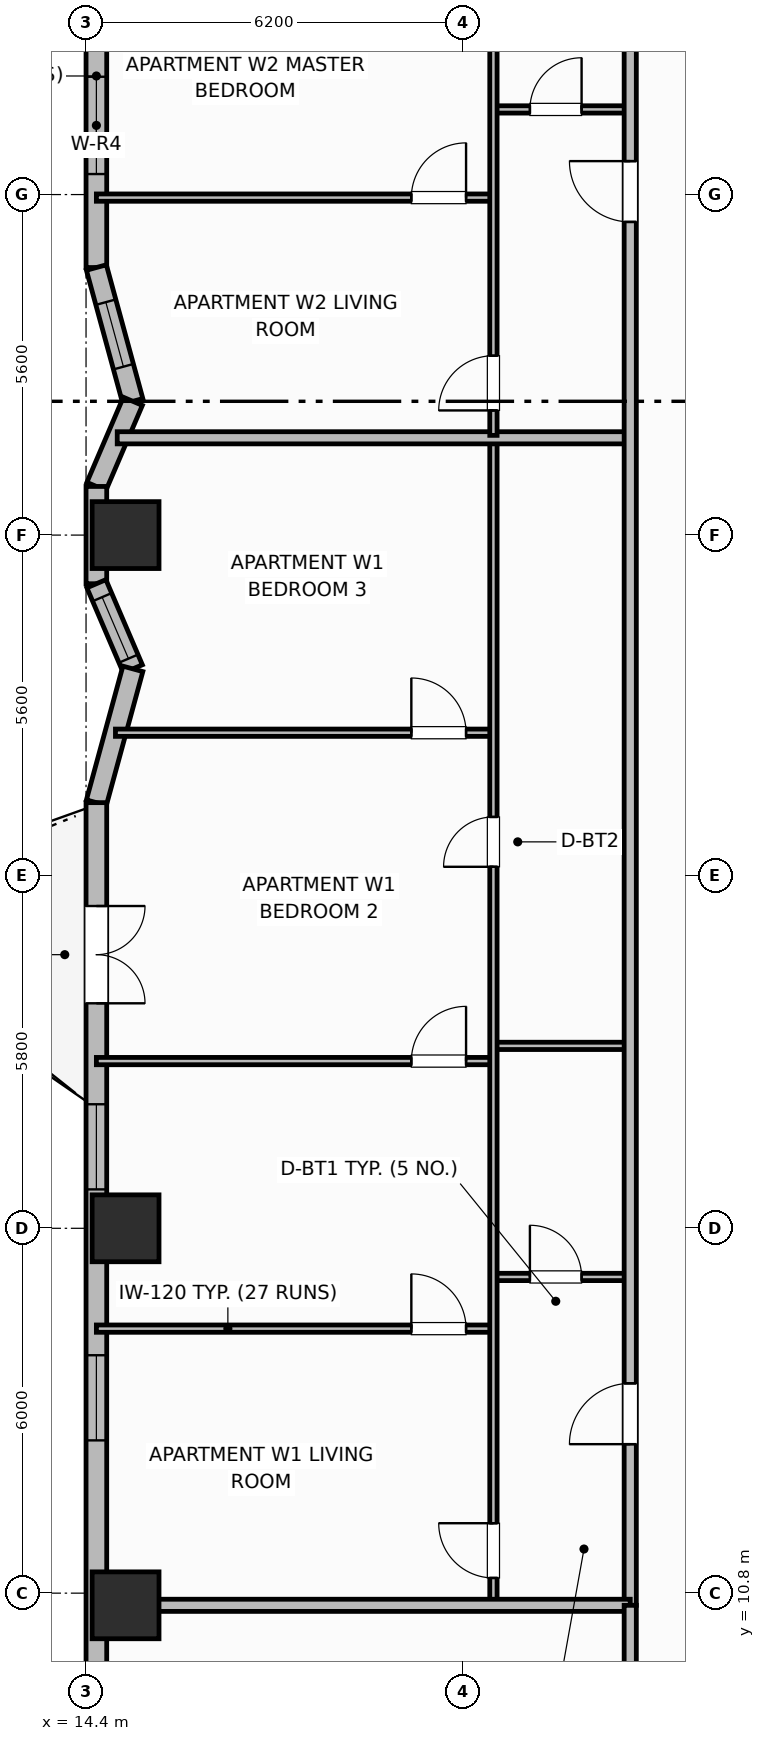
"""IFC4 building model, lengths in metres.
Left out: names, types, materials, properties, quantities, classifications, styles, units other than length and angle.
Written with IfcOpenShell. Run it as: python <this file> out.ifc"""

import sys

from ifc_helpers import new_model, si_unit, direction, frame, frame_2d, origin, origin_2d, place, context, subcontext, project, spatial, rectangle, extrude, element, fill, save


model = new_model("IFC4")
c1 = context("Model", 3, precision=1e-05, world=origin(), true_north=direction((0.0, 1.0)))
c2 = subcontext(c1, "Body", "Model", "MODEL_VIEW")
j1 = project(units=[si_unit("LENGTHUNIT", "METRE"), si_unit("PLANEANGLEUNIT", "RADIAN")], contexts=[c1])
p1 = place(None, origin())
s1 = spatial("IfcSite", under=j1, at=p1, CompositionType="ELEMENT")
p2 = place(p1, origin())
s2 = spatial("IfcBuilding", under=s1, at=p2, CompositionType="ELEMENT")
p3 = place(p2, frame((0.0, 0.0, 92.0)))
s3 = spatial("IfcBuildingStorey", under=s2, at=p3, CompositionType="ELEMENT", Elevation=92.0)
for number, where, z_axis, x_axis in (
    (1, (15.05, 10.6, 0.0), (0.0, 0.0, 1.0), (1.0, 0.0, 0.0)),
    (2, (15.05, 16.8, 0.0), (0.0, 0.0, 1.0), (1.0, 0.0, 0.0)),
    (3, (15.05, 28.2, 0.0), (0.0, 0.0, 1.0), (1.0, 0.0, 0.0)),
):
    element("IfcColumn", number, at=place(p3, frame(where, z_axis=z_axis, x_axis=x_axis)), inside=s3, PredefinedType="COLUMN", context=c2, shape_type="SweptSolid", body=[
        extrude(rectangle(XDim=1.1, YDim=1.1, at=origin_2d()), origin(), (0.0, 0.0, 1.0), 3.7),
    ])
p4 = place(p3, frame((14.57, 47.4, 0.0), z_axis=(0.0, 0.0, 1.0), x_axis=(0.0, -1.0, 0.0)))
e4 = element("IfcWall", 4, at=p4, inside=s3, PredefinedType="SOLIDWALL", context=c2, shape_type="SweptSolid", body=[
    extrude(rectangle(XDim=14.8, YDim=0.34, at=frame_2d((7.4, 0.0))), origin(), (0.0, 0.0, 1.0), 2.7),
])
p5 = place(p4, frame((2.92, 0.0, 0.69)))
e5 = element("IfcOpeningElement", 5, at=p5, cuts=e4, PredefinedType="OPENING", context=c2, shape_type="SweptSolid", body=[
    extrude(rectangle(XDim=1.4, YDim=1.85, at=frame_2d((0.7, 0.925))), frame((0.0, 0.18, 0.0), z_axis=(0.0, -1.0, 0.0), x_axis=(1.0, 0.0, 0.0)), (0.0, 0.0, 1.0), 0.36),
])
p6 = place(p4, frame((6.08, 0.0, 0.89)))
e6 = element("IfcOpeningElement", 6, at=p6, cuts=e4, PredefinedType="OPENING", context=c2, shape_type="SweptSolid", body=[
    extrude(rectangle(XDim=1.1, YDim=1.65, at=frame_2d((0.55, 0.825))), frame((0.0, 0.18, 0.0), z_axis=(0.0, -1.0, 0.0), x_axis=(1.0, 0.0, 0.0)), (0.0, 0.0, 1.0), 0.36),
])
p7 = place(p4, frame((11.663, 0.0, 0.68)))
e7 = element("IfcOpeningElement", 7, at=p7, cuts=e4, PredefinedType="OPENING", context=c2, shape_type="SweptSolid", body=[
    extrude(rectangle(XDim=1.6, YDim=1.9, at=frame_2d((0.8, 0.95))), frame((0.0, 0.18, 0.0), z_axis=(0.0, -1.0, 0.0), x_axis=(1.0, 0.0, 0.0)), (0.0, 0.0, 1.0), 0.36),
])
p8 = place(p3, frame((14.57, 32.6, 0.0), z_axis=(0.0, 0.0, 1.0), x_axis=(0.263035877812, -0.96478605244, 0.0)))
e8 = element("IfcWall", 8, at=p8, inside=s3, PredefinedType="SOLIDWALL", context=c2, shape_type="SweptSolid", body=[
    extrude(rectangle(XDim=2.281, YDim=0.34, at=frame_2d((1.14, 0.0))), origin(), (0.0, 0.0, 1.0), 2.7),
])
p9 = place(p8, frame((0.59, 0.0, 0.89)))
e9 = element("IfcOpeningElement", 9, at=p9, cuts=e8, PredefinedType="OPENING", context=c2, shape_type="SweptSolid", body=[
    extrude(rectangle(XDim=1.1, YDim=1.65, at=frame_2d((0.55, 0.825))), frame((0.0, 0.18, 0.0), z_axis=(0.0, -1.0, 0.0), x_axis=(1.0, 0.0, 0.0)), (0.0, 0.0, 1.0), 0.36),
])
p10 = place(p3, frame((15.17, 30.4, 0.0), z_axis=(0.0, 0.0, 1.0), x_axis=(-0.393861257526, -0.919169902586, 0.0)))
e10 = element("IfcWall", 10, at=p10, inside=s3, PredefinedType="SOLIDWALL", context=c2, shape_type="SweptSolid", body=[
    extrude(rectangle(XDim=1.523, YDim=0.34, at=frame_2d((0.761, 0.0))), origin(), (0.0, 0.0, 1.0), 2.7),
])
p11 = place(p3, frame((14.57, 29.0, 0.0), z_axis=(0.0, 0.0, 1.0), x_axis=(0.0, -1.0, 0.0)))
e11 = element("IfcWall", 11, at=p11, inside=s3, PredefinedType="SOLIDWALL", context=c2, shape_type="SweptSolid", body=[
    extrude(rectangle(XDim=1.6, YDim=0.34, at=frame_2d((0.8, 0.0))), origin(), (0.0, 0.0, 1.0), 2.7),
])
p12 = place(p3, frame((14.57, 27.4, 0.0), z_axis=(0.0, 0.0, 1.0), x_axis=(0.393861257526, -0.919169902586, 0.0)))
e12 = element("IfcWall", 12, at=p12, inside=s3, PredefinedType="SOLIDWALL", context=c2, shape_type="SweptSolid", body=[
    extrude(rectangle(XDim=1.523, YDim=0.34, at=frame_2d((0.761, 0.0))), origin(), (0.0, 0.0, 1.0), 2.7),
])
p13 = place(p12, frame((0.24, 0.0, 0.89)))
e13 = element("IfcOpeningElement", 13, at=p13, cuts=e12, PredefinedType="OPENING", context=c2, shape_type="SweptSolid", body=[
    extrude(rectangle(XDim=1.1, YDim=1.65, at=frame_2d((0.55, 0.825))), frame((0.0, 0.18, 0.0), z_axis=(0.0, -1.0, 0.0), x_axis=(1.0, 0.0, 0.0)), (0.0, 0.0, 1.0), 0.36),
])
p14 = place(p3, frame((15.17, 26.0, 0.0), z_axis=(0.0, 0.0, 1.0), x_axis=(-0.2630630484, -0.964778644336, 0.0)))
e14 = element("IfcWall", 14, at=p14, inside=s3, PredefinedType="SOLIDWALL", context=c2, shape_type="SweptSolid", body=[
    extrude(rectangle(XDim=2.28, YDim=0.34, at=frame_2d((1.14, 0.0))), origin(), (0.0, 0.0, 1.0), 2.7),
])
p15 = place(p3, frame((14.57, 23.8, 0.0), z_axis=(0.0, 0.0, 1.0), x_axis=(0.0, -1.0, 0.0)))
e15 = element("IfcWall", 15, at=p15, inside=s3, PredefinedType="SOLIDWALL", context=c2, shape_type="SweptSolid", body=[
    extrude(rectangle(XDim=14.8, YDim=0.34, at=frame_2d((7.4, 0.0))), origin(), (0.0, 0.0, 1.0), 2.7),
])
p16 = place(p15, frame((1.7, 0.0, 0.0)))
e16 = element("IfcOpeningElement", 16, at=p16, cuts=e15, PredefinedType="OPENING", context=c2, shape_type="SweptSolid", body=[
    extrude(rectangle(XDim=1.6, YDim=2.1, at=frame_2d((0.8, 1.05))), frame((0.0, 0.18, 0.0), z_axis=(0.0, -1.0, 0.0), x_axis=(1.0, 0.0, 0.0)), (0.0, 0.0, 1.0), 0.36),
])
p17 = place(p15, frame((4.96, 0.0, 0.69)))
e17 = element("IfcOpeningElement", 17, at=p17, cuts=e15, PredefinedType="OPENING", context=c2, shape_type="SweptSolid", body=[
    extrude(rectangle(XDim=1.4, YDim=1.85, at=frame_2d((0.7, 0.925))), frame((0.0, 0.18, 0.0), z_axis=(0.0, -1.0, 0.0), x_axis=(1.0, 0.0, 0.0)), (0.0, 0.0, 1.0), 0.36),
])
p18 = place(p15, frame((9.087, 0.0, 0.73)))
e18 = element("IfcOpeningElement", 18, at=p18, cuts=e15, PredefinedType="OPENING", context=c2, shape_type="SweptSolid", body=[
    extrude(rectangle(XDim=1.4, YDim=1.85, at=frame_2d((0.7, 0.925))), frame((0.0, 0.18, 0.0), z_axis=(0.0, -1.0, 0.0), x_axis=(1.0, 0.0, 0.0)), (0.0, 0.0, 1.0), 0.36),
])
p19 = place(p3, frame((21.1, 16.0, 0.0), z_axis=(0.0, 0.0, 1.0), x_axis=(1.0, 0.0, 0.0)))
e19 = element("IfcWall", 19, at=p19, inside=s3, PredefinedType="PARTITIONING", context=c2, shape_type="SweptSolid", body=[
    extrude(rectangle(XDim=2.25, YDim=0.12, at=frame_2d((1.125, 0.0))), origin(), (0.0, 0.0, 1.0), 2.53),
])
p20 = place(p19, frame((0.6, 0.0, 0.0)))
e20 = element("IfcOpeningElement", 20, at=p20, cuts=e19, PredefinedType="OPENING", context=c2, shape_type="SweptSolid", body=[
    extrude(rectangle(XDim=0.85, YDim=2.1, at=frame_2d((0.425, 1.05))), frame((0.0, 0.07, 0.0), z_axis=(0.0, -1.0, 0.0), x_axis=(1.0, 0.0, 0.0)), (0.0, 0.0, 1.0), 0.14),
])
p21 = place(p3, frame((21.1, 19.8, 0.0), z_axis=(0.0, 0.0, 1.0), x_axis=(1.0, 0.0, 0.0)))
e21 = element("IfcWall", 21, at=p21, inside=s3, PredefinedType="PARTITIONING", context=c2, shape_type="SweptSolid", body=[
    extrude(rectangle(XDim=2.25, YDim=0.12, at=frame_2d((1.125, 0.0))), origin(), (0.0, 0.0, 1.0), 2.53),
])
p22 = place(p3, frame((14.57, 15.15, 0.0), z_axis=(0.0, 0.0, 1.0), x_axis=(1.0, 0.0, 0.0)))
e22 = element("IfcWall", 22, at=p22, inside=s3, PredefinedType="PARTITIONING", context=c2, shape_type="SweptSolid", body=[
    extrude(rectangle(XDim=6.53, YDim=0.12, at=frame_2d((3.265, 0.0))), origin(), (0.0, 0.0, 1.0), 2.53),
])
p23 = place(p22, frame((5.18, 0.0, 0.0)))
e23 = element("IfcOpeningElement", 23, at=p23, cuts=e22, PredefinedType="OPENING", context=c2, shape_type="SweptSolid", body=[
    extrude(rectangle(XDim=0.9, YDim=2.1, at=frame_2d((0.45, 1.05))), frame((0.0, 0.07, 0.0), z_axis=(0.0, -1.0, 0.0), x_axis=(1.0, 0.0, 0.0)), (0.0, 0.0, 1.0), 0.14),
])
p24 = place(p3, frame((14.57, 19.55, 0.0), z_axis=(0.0, 0.0, 1.0), x_axis=(1.0, 0.0, 0.0)))
e24 = element("IfcWall", 24, at=p24, inside=s3, PredefinedType="PARTITIONING", context=c2, shape_type="SweptSolid", body=[
    extrude(rectangle(XDim=6.53, YDim=0.12, at=frame_2d((3.265, 0.0))), origin(), (0.0, 0.0, 1.0), 2.53),
])
p25 = place(p24, frame((5.18, 0.0, 0.0)))
e25 = element("IfcOpeningElement", 25, at=p25, cuts=e24, PredefinedType="OPENING", context=c2, shape_type="SweptSolid", body=[
    extrude(rectangle(XDim=0.9, YDim=2.1, at=frame_2d((0.45, 1.05))), frame((0.0, 0.07, 0.0), z_axis=(0.0, -1.0, 0.0), x_axis=(1.0, 0.0, 0.0)), (0.0, 0.0, 1.0), 0.14),
])
p26 = place(p3, frame((14.884, 24.95, 0.0), z_axis=(0.0, 0.0, 1.0), x_axis=(1.0, 0.0, 0.0)))
e26 = element("IfcWall", 26, at=p26, inside=s3, PredefinedType="PARTITIONING", context=c2, shape_type="SweptSolid", body=[
    extrude(rectangle(XDim=6.217, YDim=0.12, at=frame_2d((3.108, 0.0))), origin(), (0.0, 0.0, 1.0), 2.53),
])
p27 = place(p26, frame((4.866, 0.0, 0.0)))
e27 = element("IfcOpeningElement", 27, at=p27, cuts=e26, PredefinedType="OPENING", context=c2, shape_type="SweptSolid", body=[
    extrude(rectangle(XDim=0.9, YDim=2.1, at=frame_2d((0.45, 1.05))), frame((0.0, 0.07, 0.0), z_axis=(0.0, -1.0, 0.0), x_axis=(1.0, 0.0, 0.0)), (0.0, 0.0, 1.0), 0.14),
])
p28 = place(p3, frame((21.1, 10.64, 0.0), z_axis=(0.0, 0.0, 1.0), x_axis=(0.0, 1.0, 0.0)))
e28 = element("IfcWall", 28, at=p28, inside=s3, PredefinedType="PARTITIONING", context=c2, shape_type="SweptSolid", body=[
    extrude(rectangle(XDim=19.12, YDim=0.12, at=frame_2d((9.56, 0.0))), origin(), (0.0, 0.0, 1.0), 2.53),
])
p29 = place(p28, frame((0.41, 0.0, 0.0)))
e29 = element("IfcOpeningElement", 29, at=p29, cuts=e28, PredefinedType="OPENING", context=c2, shape_type="SweptSolid", body=[
    extrude(rectangle(XDim=0.9, YDim=2.1, at=frame_2d((0.45, 1.05))), frame((0.0, 0.07, 0.0), z_axis=(0.0, -1.0, 0.0), x_axis=(1.0, 0.0, 0.0)), (0.0, 0.0, 1.0), 0.14),
])
p30 = place(p28, frame((12.105, 0.0, 0.0)))
e30 = element("IfcOpeningElement", 30, at=p30, cuts=e28, PredefinedType="OPENING", context=c2, shape_type="SweptSolid", body=[
    extrude(rectangle(XDim=0.82, YDim=2.08, at=frame_2d((0.41, 1.04))), frame((0.0, 0.07, 0.0), z_axis=(0.0, -1.0, 0.0), x_axis=(1.0, 0.0, 0.0)), (0.0, 0.0, 1.0), 0.14),
])
p31 = place(p3, frame((14.913, 29.8, 0.0), z_axis=(0.0, 0.0, 1.0), x_axis=(1.0, 0.0, 0.0)))
e31 = element("IfcWall", 31, at=p31, inside=s3, PredefinedType="PARTITIONING", context=c2, shape_type="SweptSolid", body=[
    extrude(rectangle(XDim=8.437, YDim=0.2, at=frame_2d((4.219, 0.0))), origin(), (0.0, 0.0, 1.0), 2.53),
])
p32 = place(p3, frame((21.1, 35.2, 0.0), z_axis=(0.0, 0.0, 1.0), x_axis=(1.0, 0.0, 0.0)))
e32 = element("IfcWall", 32, at=p32, inside=s3, PredefinedType="PARTITIONING", context=c2, shape_type="SweptSolid", body=[
    extrude(rectangle(XDim=2.25, YDim=0.12, at=frame_2d((1.125, 0.0))), origin(), (0.0, 0.0, 1.0), 2.53),
])
p33 = place(p32, frame((0.6, 0.0, 0.0)))
e33 = element("IfcOpeningElement", 33, at=p33, cuts=e32, PredefinedType="OPENING", context=c2, shape_type="SweptSolid", body=[
    extrude(rectangle(XDim=0.85, YDim=2.1, at=frame_2d((0.425, 1.05))), frame((0.0, 0.07, 0.0), z_axis=(0.0, -1.0, 0.0), x_axis=(1.0, 0.0, 0.0)), (0.0, 0.0, 1.0), 0.14),
])
p34 = place(p3, frame((14.57, 33.75, 0.0), z_axis=(0.0, 0.0, 1.0), x_axis=(1.0, 0.0, 0.0)))
e34 = element("IfcWall", 34, at=p34, inside=s3, PredefinedType="PARTITIONING", context=c2, shape_type="SweptSolid", body=[
    extrude(rectangle(XDim=6.53, YDim=0.12, at=frame_2d((3.265, 0.0))), origin(), (0.0, 0.0, 1.0), 2.53),
])
p35 = place(p34, frame((5.18, 0.0, 0.0)))
e35 = element("IfcOpeningElement", 35, at=p35, cuts=e34, PredefinedType="OPENING", context=c2, shape_type="SweptSolid", body=[
    extrude(rectangle(XDim=0.9, YDim=2.1, at=frame_2d((0.45, 1.05))), frame((0.0, 0.07, 0.0), z_axis=(0.0, -1.0, 0.0), x_axis=(1.0, 0.0, 0.0)), (0.0, 0.0, 1.0), 0.14),
])
p36 = place(p3, frame((21.1, 29.84, 0.0), z_axis=(0.0, 0.0, 1.0), x_axis=(0.0, 1.0, 0.0)))
e36 = element("IfcWall", 36, at=p36, inside=s3, PredefinedType="PARTITIONING", context=c2, shape_type="SweptSolid", body=[
    extrude(rectangle(XDim=15.92, YDim=0.12, at=frame_2d((7.96, 0.0))), origin(), (0.0, 0.0, 1.0), 2.53),
])
p37 = place(p36, frame((0.41, 0.0, 0.0)))
e37 = element("IfcOpeningElement", 37, at=p37, cuts=e36, PredefinedType="OPENING", context=c2, shape_type="SweptSolid", body=[
    extrude(rectangle(XDim=0.9, YDim=2.1, at=frame_2d((0.45, 1.05))), frame((0.0, 0.07, 0.0), z_axis=(0.0, -1.0, 0.0), x_axis=(1.0, 0.0, 0.0)), (0.0, 0.0, 1.0), 0.14),
])
p38 = place(p36, frame((13.125, 0.0, 0.0)))
e38 = element("IfcOpeningElement", 38, at=p38, cuts=e36, PredefinedType="OPENING", context=c2, shape_type="SweptSolid", body=[
    extrude(rectangle(XDim=0.82, YDim=2.08, at=frame_2d((0.41, 1.04))), frame((0.0, 0.07, 0.0), z_axis=(0.0, -1.0, 0.0), x_axis=(1.0, 0.0, 0.0)), (0.0, 0.0, 1.0), 0.14),
])
p39 = place(p3, frame((23.35, 10.6, 0.0), z_axis=(0.0, 0.0, 1.0), x_axis=(0.0, 1.0, 0.0)))
e39 = element("IfcWall", 39, at=p39, inside=s3, PredefinedType="PARTITIONING", context=c2, shape_type="SweptSolid", body=[
    extrude(rectangle(XDim=35.2, YDim=0.2, at=frame_2d((17.6, 0.0))), origin(), (0.0, 0.0, 1.0), 2.53),
])
p40 = place(p39, frame((2.65, 0.0, 0.0)))
e40 = element("IfcOpeningElement", 40, at=p40, cuts=e39, PredefinedType="OPENING", context=c2, shape_type="SweptSolid", body=[
    extrude(rectangle(XDim=1.0, YDim=2.15, at=frame_2d((0.5, 1.075))), frame((0.0, 0.11, 0.0), z_axis=(0.0, -1.0, 0.0), x_axis=(1.0, 0.0, 0.0)), (0.0, 0.0, 1.0), 0.22),
])
p41 = place(p39, frame((22.75, 0.0, 0.0)))
e41 = element("IfcOpeningElement", 41, at=p41, cuts=e39, PredefinedType="OPENING", context=c2, shape_type="SweptSolid", body=[
    extrude(rectangle(XDim=1.0, YDim=2.15, at=frame_2d((0.5, 1.075))), frame((0.0, 0.11, 0.0), z_axis=(0.0, -1.0, 0.0), x_axis=(1.0, 0.0, 0.0)), (0.0, 0.0, 1.0), 0.22),
])
p42 = place(p3, frame((14.99, 10.6, 0.0), z_axis=(0.0, 0.0, 1.0), x_axis=(1.0, 0.0, 0.0)))
e42 = element("IfcWall", 42, at=p42, inside=s3, PredefinedType="PARTITIONING", context=c2, shape_type="SweptSolid", body=[
    extrude(rectangle(XDim=8.36, YDim=0.2, at=frame_2d((4.18, 0.0))), origin(), (0.0, 0.0, 1.0), 2.53),
])
p43 = place(p3, frame((23.35, 4.97, 0.0), z_axis=(0.0, 0.0, 1.0), x_axis=(0.0, 1.0, 0.0)))
e43 = element("IfcWall", 43, at=p43, inside=s3, PredefinedType="PARTITIONING", context=c2, shape_type="SweptSolid", body=[
    extrude(rectangle(XDim=5.63, YDim=0.2, at=frame_2d((2.815, 0.0))), origin(), (0.0, 0.0, 1.0), 2.53),
])
p44 = place(p7, origin())
e44 = element("IfcWindow", 44, at=p44, inside=s3, PartitioningType="SINGLE_PANEL", PredefinedType="WINDOW", context=c2, shape_type="SweptSolid", body=[
    extrude(rectangle(XDim=1.6, YDim=1.9, at=frame_2d((0.8, 0.95))), frame((0.0, 0.03, 0.0), z_axis=(0.0, -1.0, 0.0), x_axis=(1.0, 0.0, 0.0)), (0.0, 0.0, 1.0), 0.06),
])
fill(e7, e44)
p45 = place(p9, origin())
e45 = element("IfcWindow", 45, at=p45, inside=s3, PartitioningType="SINGLE_PANEL", PredefinedType="WINDOW", context=c2, shape_type="SweptSolid", body=[
    extrude(rectangle(XDim=1.1, YDim=1.65, at=frame_2d((0.55, 0.825))), frame((0.0, 0.03, 0.0), z_axis=(0.0, -1.0, 0.0), x_axis=(1.0, 0.0, 0.0)), (0.0, 0.0, 1.0), 0.06),
])
fill(e9, e45)
p46 = place(p13, origin())
e46 = element("IfcWindow", 46, at=p46, inside=s3, PartitioningType="SINGLE_PANEL", PredefinedType="WINDOW", context=c2, shape_type="SweptSolid", body=[
    extrude(rectangle(XDim=1.1, YDim=1.65, at=frame_2d((0.55, 0.825))), frame((0.0, 0.03, 0.0), z_axis=(0.0, -1.0, 0.0), x_axis=(1.0, 0.0, 0.0)), (0.0, 0.0, 1.0), 0.06),
])
fill(e13, e46)
p47 = place(p16, origin())
e47 = element("IfcDoor", 47, at=p47, inside=s3, OperationType="DOUBLE_DOOR_SINGLE_SWING", PredefinedType="DOOR", context=c2, shape_type="SweptSolid", body=[
    extrude(rectangle(XDim=1.6, YDim=2.1, at=frame_2d((0.8, 1.05))), frame((0.0, 0.025, 0.0), z_axis=(0.0, -1.0, 0.0), x_axis=(1.0, 0.0, 0.0)), (0.0, 0.0, 1.0), 0.05),
])
fill(e16, e47)
p48 = place(p17, origin())
e48 = element("IfcWindow", 48, at=p48, inside=s3, PartitioningType="SINGLE_PANEL", PredefinedType="WINDOW", context=c2, shape_type="SweptSolid", body=[
    extrude(rectangle(XDim=1.4, YDim=1.85, at=frame_2d((0.7, 0.925))), frame((0.0, 0.03, 0.0), z_axis=(0.0, -1.0, 0.0), x_axis=(1.0, 0.0, 0.0)), (0.0, 0.0, 1.0), 0.06),
])
fill(e17, e48)
p49 = place(p18, origin())
e49 = element("IfcWindow", 49, at=p49, inside=s3, PartitioningType="SINGLE_PANEL", PredefinedType="WINDOW", context=c2, shape_type="SweptSolid", body=[
    extrude(rectangle(XDim=1.4, YDim=1.85, at=frame_2d((0.7, 0.925))), frame((0.0, 0.03, 0.0), z_axis=(0.0, -1.0, 0.0), x_axis=(1.0, 0.0, 0.0)), (0.0, 0.0, 1.0), 0.06),
])
fill(e18, e49)
p50 = place(p20, origin())
e50 = element("IfcDoor", 50, at=p50, inside=s3, OperationType="SINGLE_SWING_LEFT", PredefinedType="DOOR", context=c2, shape_type="SweptSolid", body=[
    extrude(rectangle(XDim=0.85, YDim=2.1, at=frame_2d((0.425, 1.05))), frame((0.0, 0.025, 0.0), z_axis=(0.0, -1.0, 0.0), x_axis=(1.0, 0.0, 0.0)), (0.0, 0.0, 1.0), 0.05),
])
fill(e20, e50)
p51 = place(p23, origin())
e51 = element("IfcDoor", 51, at=p51, inside=s3, OperationType="SINGLE_SWING_LEFT", PredefinedType="DOOR", context=c2, shape_type="SweptSolid", body=[
    extrude(rectangle(XDim=0.9, YDim=2.1, at=frame_2d((0.45, 1.05))), frame((0.0, 0.025, 0.0), z_axis=(0.0, -1.0, 0.0), x_axis=(1.0, 0.0, 0.0)), (0.0, 0.0, 1.0), 0.05),
])
fill(e23, e51)
p52 = place(p25, origin())
e52 = element("IfcDoor", 52, at=p52, inside=s3, OperationType="SINGLE_SWING_RIGHT", PredefinedType="DOOR", context=c2, shape_type="SweptSolid", body=[
    extrude(rectangle(XDim=0.9, YDim=2.1, at=frame_2d((0.45, 1.05))), frame((0.0, 0.025, 0.0), z_axis=(0.0, -1.0, 0.0), x_axis=(1.0, 0.0, 0.0)), (0.0, 0.0, 1.0), 0.05),
])
fill(e25, e52)
p53 = place(p27, origin())
e53 = element("IfcDoor", 53, at=p53, inside=s3, OperationType="SINGLE_SWING_LEFT", PredefinedType="DOOR", context=c2, shape_type="SweptSolid", body=[
    extrude(rectangle(XDim=0.9, YDim=2.1, at=frame_2d((0.45, 1.05))), frame((0.0, 0.025, 0.0), z_axis=(0.0, -1.0, 0.0), x_axis=(1.0, 0.0, 0.0)), (0.0, 0.0, 1.0), 0.05),
])
fill(e27, e53)
p54 = place(p29, origin())
e54 = element("IfcDoor", 54, at=p54, inside=s3, OperationType="SINGLE_SWING_RIGHT", PredefinedType="DOOR", context=c2, shape_type="SweptSolid", body=[
    extrude(rectangle(XDim=0.9, YDim=2.1, at=frame_2d((0.45, 1.05))), frame((0.0, 0.025, 0.0), z_axis=(0.0, -1.0, 0.0), x_axis=(1.0, 0.0, 0.0)), (0.0, 0.0, 1.0), 0.05),
])
fill(e29, e54)
p55 = place(p30, origin())
e55 = element("IfcDoor", 55, at=p55, inside=s3, OperationType="SINGLE_SWING_LEFT", PredefinedType="DOOR", context=c2, shape_type="SweptSolid", body=[
    extrude(rectangle(XDim=0.82, YDim=2.08, at=frame_2d((0.41, 1.04))), frame((0.0, 0.025, 0.0), z_axis=(0.0, -1.0, 0.0), x_axis=(1.0, 0.0, 0.0)), (0.0, 0.0, 1.0), 0.05),
])
fill(e30, e55)
p56 = place(p33, origin())
e56 = element("IfcDoor", 56, at=p56, inside=s3, OperationType="SINGLE_SWING_RIGHT", PredefinedType="DOOR", context=c2, shape_type="SweptSolid", body=[
    extrude(rectangle(XDim=0.85, YDim=2.1, at=frame_2d((0.425, 1.05))), frame((0.0, 0.025, 0.0), z_axis=(0.0, -1.0, 0.0), x_axis=(1.0, 0.0, 0.0)), (0.0, 0.0, 1.0), 0.05),
])
fill(e33, e56)
p57 = place(p35, origin())
e57 = element("IfcDoor", 57, at=p57, inside=s3, OperationType="SINGLE_SWING_RIGHT", PredefinedType="DOOR", context=c2, shape_type="SweptSolid", body=[
    extrude(rectangle(XDim=0.9, YDim=2.1, at=frame_2d((0.45, 1.05))), frame((0.0, 0.025, 0.0), z_axis=(0.0, -1.0, 0.0), x_axis=(1.0, 0.0, 0.0)), (0.0, 0.0, 1.0), 0.05),
])
fill(e35, e57)
p58 = place(p37, origin())
e58 = element("IfcDoor", 58, at=p58, inside=s3, OperationType="SINGLE_SWING_LEFT", PredefinedType="DOOR", context=c2, shape_type="SweptSolid", body=[
    extrude(rectangle(XDim=0.9, YDim=2.1, at=frame_2d((0.45, 1.05))), frame((0.0, 0.025, 0.0), z_axis=(0.0, -1.0, 0.0), x_axis=(1.0, 0.0, 0.0)), (0.0, 0.0, 1.0), 0.05),
])
fill(e37, e58)
p59 = place(p40, origin())
e59 = element("IfcDoor", 59, at=p59, inside=s3, OperationType="SINGLE_SWING_LEFT", PredefinedType="DOOR", context=c2, shape_type="SweptSolid", body=[
    extrude(rectangle(XDim=1.0, YDim=2.15, at=frame_2d((0.5, 1.075))), frame((0.0, 0.025, 0.0), z_axis=(0.0, -1.0, 0.0), x_axis=(1.0, 0.0, 0.0)), (0.0, 0.0, 1.0), 0.05),
])
fill(e40, e59)
p60 = place(p41, origin())
e60 = element("IfcDoor", 60, at=p60, inside=s3, OperationType="SINGLE_SWING_RIGHT", PredefinedType="DOOR", context=c2, shape_type="SweptSolid", body=[
    extrude(rectangle(XDim=1.0, YDim=2.15, at=frame_2d((0.5, 1.075))), frame((0.0, 0.025, 0.0), z_axis=(0.0, -1.0, 0.0), x_axis=(1.0, 0.0, 0.0)), (0.0, 0.0, 1.0), 0.05),
])
fill(e41, e60)
save(model, sys.argv[1])
